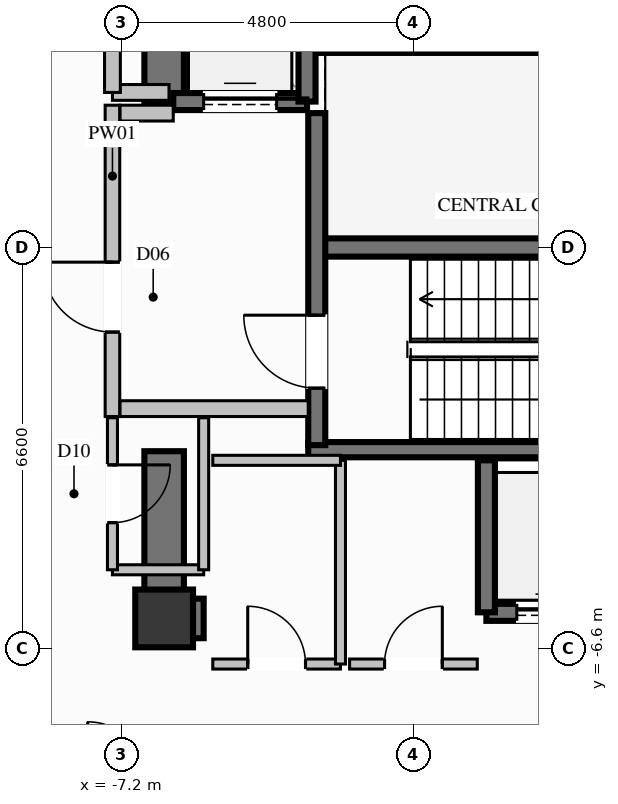
"""IFC4 building model, lengths in metres.
Left out: names, types, materials, properties, quantities, classifications, styles, units other than length and angle.
Written with IfcOpenShell. Run it as: python <this file> out.ifc"""

import sys

from ifc_helpers import new_model, si_unit, direction, frame, frame_2d, origin, origin_2d, place, context, subcontext, project, spatial, rectangle, extrude, element, fill, save


model = new_model("IFC4")
c1 = context("Model", 3, precision=1e-05, world=origin(), true_north=direction((0.0, 1.0)))
c2 = subcontext(c1, "Body", "Model", "MODEL_VIEW")
j1 = project(units=[si_unit("LENGTHUNIT", "METRE"), si_unit("PLANEANGLEUNIT", "RADIAN")], contexts=[c1])
p1 = place(None, origin())
s1 = spatial("IfcSite", under=j1, at=p1, CompositionType="ELEMENT")
p2 = place(p1, origin())
s2 = spatial("IfcBuilding", under=s1, at=p2, CompositionType="ELEMENT")
p3 = place(p2, frame((0.0, 0.0, 109.8)))
s3 = spatial("IfcBuildingStorey", under=s2, at=p3, CompositionType="ELEMENT", Elevation=109.8)
p4 = place(p3, frame((-6.5, -6.1, 0.0), z_axis=(0.0, 0.0, 1.0), x_axis=(1.0, 0.0, 0.0)))
e1 = element("IfcColumn", 1, at=p4, inside=s3, PredefinedType="COLUMN", context=c2, shape_type="SweptSolid", body=[
    extrude(rectangle(XDim=0.95, YDim=0.95, at=origin_2d()), origin(), (0.0, 0.0, 1.0), 3.6),
])
p5 = place(p3, frame((-3.99, 0.0, 0.0), z_axis=(0.0, 0.0, 1.0), x_axis=(1.0, 0.0, 0.0)))
e2 = element("IfcWall", 2, at=p5, inside=s3, PredefinedType="SHEAR", context=c2, shape_type="SweptSolid", body=[
    extrude(rectangle(XDim=7.98, YDim=0.3, at=frame_2d((3.99, 0.0))), origin(), (0.0, 0.0, 1.0), 3.6),
])
for number, where, z_axis, x_axis in (
    (3, (-4.13, -3.325, 0.0), (0.0, 0.0, 1.0), (1.0, 0.0, 0.0)),
    (4, (-4.13, 3.325, 0.0), (0.0, 0.0, 1.0), (1.0, 0.0, 0.0)),
):
    element("IfcWall", number, at=place(p3, frame(where, z_axis=z_axis, x_axis=x_axis)), inside=s3, PredefinedType="SOLIDWALL", context=c2, shape_type="SweptSolid", body=[
        extrude(rectangle(XDim=8.26, YDim=0.25, at=frame_2d((4.13, 0.0))), origin(), (0.0, 0.0, 1.0), 3.6),
    ])
p6 = place(p3, frame((-6.175, -6.1, 0.0), z_axis=(0.0, 0.0, 1.0), x_axis=(1.0, 0.0, 0.0)))
e5 = element("IfcWall", 5, at=p6, inside=s3, PredefinedType="SHEAR", context=c2, shape_type="SweptSolid", body=[
    extrude(rectangle(XDim=0.325, YDim=0.65, at=frame_2d((0.163, 0.0))), origin(), (0.0, 0.0, 1.0), 3.6),
])
p7 = place(p3, frame((-6.5, 2.35, 0.0), z_axis=(0.0, 0.0, 1.0), x_axis=(0.0, 1.0, 0.0)))
e6 = element("IfcWall", 6, at=p7, inside=s3, PredefinedType="SHEAR", context=c2, shape_type="SweptSolid", body=[
    extrude(rectangle(XDim=4.075, YDim=0.65, at=frame_2d((2.038, 0.0))), origin(), (0.0, 0.0, 1.0), 3.6),
])
p8 = place(p3, frame((-6.5, -6.425, 0.0), z_axis=(0.0, 0.0, 1.0), x_axis=(0.0, 1.0, 0.0)))
e7 = element("IfcWall", 7, at=p8, inside=s3, PredefinedType="SHEAR", context=c2, shape_type="SweptSolid", body=[
    extrude(rectangle(XDim=3.075, YDim=0.65, at=frame_2d((1.538, 0.0))), origin(), (0.0, 0.0, 1.0), 3.6),
])
p9 = place(p3, frame((-1.2, -6.0, 0.0), z_axis=(0.0, 0.0, 1.0), x_axis=(1.0, 0.0, 0.0)))
e8 = element("IfcWall", 8, at=p9, inside=s3, PredefinedType="SOLIDWALL", context=c2, shape_type="SweptSolid", body=[
    extrude(rectangle(XDim=2.1, YDim=0.28, at=frame_2d((1.05, 0.0))), origin(), (0.0, 0.0, 1.0), 3.35),
])
p10 = place(p9, frame((0.5, 0.0, 0.0)))
e9 = element("IfcOpeningElement", 9, at=p10, cuts=e8, PredefinedType="OPENING", context=c2, shape_type="SweptSolid", body=[
    extrude(rectangle(XDim=1.1, YDim=2.2, at=frame_2d((0.55, 1.1))), frame((0.0, 0.15, 0.0), z_axis=(0.0, -1.0, 0.0), x_axis=(1.0, 0.0, 0.0)), (0.0, 0.0, 1.0), 0.3),
])
p11 = place(p3, frame((-1.2, -3.5, 0.0), z_axis=(0.0, 0.0, 1.0), x_axis=(0.0, -1.0, 0.0)))
e10 = element("IfcWall", 10, at=p11, inside=s3, PredefinedType="SOLIDWALL", context=c2, shape_type="SweptSolid", body=[
    extrude(rectangle(XDim=2.5, YDim=0.28, at=frame_2d((1.25, 0.0))), origin(), (0.0, 0.0, 1.0), 3.35),
])
p12 = place(p3, frame((-6.35, 2.4, 0.0), z_axis=(0.0, 0.0, 1.0), x_axis=(1.0, 0.0, 0.0)))
e11 = element("IfcWall", 11, at=p12, inside=s3, PredefinedType="SOLIDWALL", context=c2, shape_type="SweptSolid", body=[
    extrude(rectangle(XDim=2.2, YDim=0.28, at=frame_2d((1.1, 0.0))), origin(), (0.0, 0.0, 1.0), 3.35),
])
p13 = place(p12, frame((0.5, 0.0, 0.0)))
e12 = element("IfcOpeningElement", 12, at=p13, cuts=e11, PredefinedType="OPENING", context=c2, shape_type="SweptSolid", body=[
    extrude(rectangle(XDim=1.2, YDim=2.2, at=frame_2d((0.6, 1.1))), frame((0.0, 0.15, 0.0), z_axis=(0.0, -1.0, 0.0), x_axis=(1.0, 0.0, 0.0)), (0.0, 0.0, 1.0), 0.3),
])
p14 = place(p3, frame((-4.15, 2.4, 0.0), z_axis=(0.0, 0.0, 1.0), x_axis=(0.0, 1.0, 0.0)))
e13 = element("IfcWall", 13, at=p14, inside=s3, PredefinedType="SOLIDWALL", context=c2, shape_type="SweptSolid", body=[
    extrude(rectangle(XDim=2.7, YDim=0.28, at=frame_2d((1.35, 0.0))), origin(), (0.0, 0.0, 1.0), 3.35),
])
p15 = place(p3, frame((-3.99, -3.25, 0.0), z_axis=(0.0, 0.0, 1.0), x_axis=(0.0, 1.0, 0.0)))
e14 = element("IfcWall", 14, at=p15, inside=s3, PredefinedType="SOLIDWALL", context=c2, shape_type="SweptSolid", body=[
    extrude(rectangle(XDim=5.46, YDim=0.28, at=frame_2d((2.73, 0.0))), origin(), (0.0, 0.0, 1.0), 3.35),
])
p16 = place(p15, frame((0.937, 0.0, 0.0)))
e15 = element("IfcOpeningElement", 15, at=p16, cuts=e14, PredefinedType="OPENING", context=c2, shape_type="SweptSolid", body=[
    extrude(rectangle(XDim=1.2, YDim=2.2, at=frame_2d((0.6, 1.1))), frame((0.0, 0.15, 0.0), z_axis=(0.0, -1.0, 0.0), x_axis=(1.0, 0.0, 0.0)), (0.0, 0.0, 1.0), 0.3),
])
p17 = place(p3, frame((-7.35, -2.78, 0.0), z_axis=(0.0, 0.0, 1.0), x_axis=(0.0, 1.0, 0.0)))
e16 = element("IfcWall", 16, at=p17, inside=s3, PredefinedType="PARTITIONING", context=c2, shape_type="SweptSolid", body=[
    extrude(rectangle(XDim=5.12, YDim=0.24, at=frame_2d((2.56, 0.0))), origin(), (0.0, 0.0, 1.0), 2.435),
])
p18 = place(p17, frame((1.389, 0.0, 0.0)))
e17 = element("IfcOpeningElement", 17, at=p18, cuts=e16, PredefinedType="OPENING", context=c2, shape_type="SweptSolid", body=[
    extrude(rectangle(XDim=1.15, YDim=2.2, at=frame_2d((0.575, 1.1))), frame((0.0, 0.13, 0.0), z_axis=(0.0, -1.0, 0.0), x_axis=(1.0, 0.0, 0.0)), (0.0, 0.0, 1.0), 0.26),
])
p19 = place(p3, frame((-7.225, -2.65, 0.0), z_axis=(0.0, 0.0, 1.0), x_axis=(1.0, 0.0, 0.0)))
e18 = element("IfcWall", 18, at=p19, inside=s3, PredefinedType="PARTITIONING", context=c2, shape_type="SweptSolid", body=[
    extrude(rectangle(XDim=3.095, YDim=0.26, at=frame_2d((1.548, 0.0))), origin(), (0.0, 0.0, 1.0), 3.35),
])
p20 = place(p3, frame((-7.225, 2.21, 0.0), z_axis=(0.0, 0.0, 1.0), x_axis=(1.0, 0.0, 0.0)))
e19 = element("IfcWall", 19, at=p20, inside=s3, PredefinedType="PARTITIONING", context=c2, shape_type="SweptSolid", body=[
    extrude(rectangle(XDim=0.875, YDim=0.26, at=frame_2d((0.438, 0.0))), origin(), (0.0, 0.0, 1.0), 3.35),
])
p21 = place(p3, frame((-7.35, 2.55, 0.0), z_axis=(0.0, 0.0, 1.0), x_axis=(1.0, 0.0, 0.0)))
e20 = element("IfcWall", 20, at=p21, inside=s3, PredefinedType="PARTITIONING", context=c2, shape_type="SweptSolid", body=[
    extrude(rectangle(XDim=0.93, YDim=0.26, at=frame_2d((0.465, 0.0))), origin(), (0.0, 0.0, 1.0), 3.35),
])
p22 = place(p3, frame((-7.35, 2.55, 0.0), z_axis=(0.0, 0.0, 1.0), x_axis=(0.0, 1.0, 0.0)))
e21 = element("IfcWall", 21, at=p22, inside=s3, PredefinedType="PARTITIONING", context=c2, shape_type="SweptSolid", body=[
    extrude(rectangle(XDim=2.4, YDim=0.26, at=frame_2d((1.2, 0.0))), origin(), (0.0, 0.0, 1.0), 2.435),
])
p23 = place(p22, frame((0.775, 0.0, 0.0)))
e22 = element("IfcOpeningElement", 22, at=p23, cuts=e21, PredefinedType="OPENING", context=c2, shape_type="SweptSolid", body=[
    extrude(rectangle(XDim=0.85, YDim=2.05, at=frame_2d((0.425, 1.025))), frame((0.0, 0.14, 0.0), z_axis=(0.0, -1.0, 0.0), x_axis=(1.0, 0.0, 0.0)), (0.0, 0.0, 1.0), 0.28),
])
p24 = place(p3, frame((-7.35, -5.3, 0.0), z_axis=(0.0, 0.0, 1.0), x_axis=(1.0, 0.0, 0.0)))
e23 = element("IfcWall", 23, at=p24, inside=s3, PredefinedType="PARTITIONING", context=c2, shape_type="SweptSolid", body=[
    extrude(rectangle(XDim=1.5, YDim=0.165, at=frame_2d((0.75, 0.0))), origin(), (0.0, 0.0, 1.0), 2.435),
])
p25 = place(p3, frame((-5.85, -5.3, 0.0), z_axis=(0.0, 0.0, 1.0), x_axis=(0.0, 1.0, 0.0)))
e24 = element("IfcWall", 24, at=p25, inside=s3, PredefinedType="PARTITIONING", context=c2, shape_type="SweptSolid", body=[
    extrude(rectangle(XDim=2.5, YDim=0.165, at=frame_2d((1.25, 0.0))), origin(), (0.0, 0.0, 1.0), 2.435),
])
p26 = place(p3, frame((-7.35, -2.8, 0.0), z_axis=(0.0, 0.0, 1.0), x_axis=(0.0, -1.0, 0.0)))
e25 = element("IfcWall", 25, at=p26, inside=s3, PredefinedType="PARTITIONING", context=c2, shape_type="SweptSolid", body=[
    extrude(rectangle(XDim=2.5, YDim=0.165, at=frame_2d((1.25, 0.0))), origin(), (0.0, 0.0, 1.0), 3.35),
])
p27 = place(p26, frame((0.775, 0.0, 0.0)))
e26 = element("IfcOpeningElement", 26, at=p27, cuts=e25, PredefinedType="OPENING", context=c2, shape_type="SweptSolid", body=[
    extrude(rectangle(XDim=0.95, YDim=2.1, at=frame_2d((0.475, 1.05))), frame((0.0, 0.093, 0.0), z_axis=(0.0, -1.0, 0.0), x_axis=(1.0, 0.0, 0.0)), (0.0, 0.0, 1.0), 0.185),
])
p28 = place(p3, frame((-5.7, -6.85, 0.0), z_axis=(0.0, 0.0, 1.0), x_axis=(1.0, 0.0, 0.0)))
e27 = element("IfcWall", 27, at=p28, inside=s3, PredefinedType="PARTITIONING", context=c2, shape_type="SweptSolid", body=[
    extrude(rectangle(XDim=2.1, YDim=0.165, at=frame_2d((1.05, 0.0))), origin(), (0.0, 0.0, 1.0), 2.435),
])
p29 = place(p28, frame((0.575, 0.0, 0.0)))
e28 = element("IfcOpeningElement", 28, at=p29, cuts=e27, PredefinedType="OPENING", context=c2, shape_type="SweptSolid", body=[
    extrude(rectangle(XDim=0.95, YDim=2.1, at=frame_2d((0.475, 1.05))), frame((0.0, 0.093, 0.0), z_axis=(0.0, -1.0, 0.0), x_axis=(1.0, 0.0, 0.0)), (0.0, 0.0, 1.0), 0.185),
])
p30 = place(p3, frame((-3.6, -6.85, 0.0), z_axis=(0.0, 0.0, 1.0), x_axis=(0.0, 1.0, 0.0)))
e29 = element("IfcWall", 29, at=p30, inside=s3, PredefinedType="PARTITIONING", context=c2, shape_type="SweptSolid", body=[
    extrude(rectangle(XDim=3.35, YDim=0.165, at=frame_2d((1.675, 0.0))), origin(), (0.0, 0.0, 1.0), 3.35),
])
p31 = place(p3, frame((-3.6, -3.5, 0.0), z_axis=(0.0, 0.0, 1.0), x_axis=(-1.0, 0.0, 0.0)))
e30 = element("IfcWall", 30, at=p31, inside=s3, PredefinedType="PARTITIONING", context=c2, shape_type="SweptSolid", body=[
    extrude(rectangle(XDim=2.1, YDim=0.165, at=frame_2d((1.05, 0.0))), origin(), (0.0, 0.0, 1.0), 3.35),
])
p32 = place(p3, frame((-3.45, -6.85, 0.0), z_axis=(0.0, 0.0, 1.0), x_axis=(1.0, 0.0, 0.0)))
e31 = element("IfcWall", 31, at=p32, inside=s3, PredefinedType="PARTITIONING", context=c2, shape_type="SweptSolid", body=[
    extrude(rectangle(XDim=2.1, YDim=0.165, at=frame_2d((1.05, 0.0))), origin(), (0.0, 0.0, 1.0), 2.435),
])
p33 = place(p32, frame((0.575, 0.0, 0.0)))
e32 = element("IfcOpeningElement", 32, at=p33, cuts=e31, PredefinedType="OPENING", context=c2, shape_type="SweptSolid", body=[
    extrude(rectangle(XDim=0.95, YDim=2.1, at=frame_2d((0.475, 1.05))), frame((0.0, 0.093, 0.0), z_axis=(0.0, -1.0, 0.0), x_axis=(1.0, 0.0, 0.0)), (0.0, 0.0, 1.0), 0.185),
])
p34 = place(p10, origin())
e33 = element("IfcDoor", 33, at=p34, inside=s3, OperationType="SLIDING_TO_LEFT", PredefinedType="DOOR", context=c2, shape_type="SweptSolid", body=[
    extrude(rectangle(XDim=1.1, YDim=2.2, at=frame_2d((0.55, 1.1))), frame((0.0, 0.025, 0.0), z_axis=(0.0, -1.0, 0.0), x_axis=(1.0, 0.0, 0.0)), (0.0, 0.0, 1.0), 0.05),
])
fill(e9, e33)
p35 = place(p13, origin())
e34 = element("IfcDoor", 34, at=p35, inside=s3, OperationType="SLIDING_TO_LEFT", PredefinedType="DOOR", context=c2, shape_type="SweptSolid", body=[
    extrude(rectangle(XDim=1.2, YDim=2.2, at=frame_2d((0.6, 1.1))), frame((0.0, 0.025, 0.0), z_axis=(0.0, -1.0, 0.0), x_axis=(1.0, 0.0, 0.0)), (0.0, 0.0, 1.0), 0.05),
])
fill(e12, e34)
p36 = place(p16, origin())
e35 = element("IfcDoor", 35, at=p36, inside=s3, OperationType="SINGLE_SWING_RIGHT", PredefinedType="DOOR", context=c2, shape_type="SweptSolid", body=[
    extrude(rectangle(XDim=1.2, YDim=2.2, at=frame_2d((0.6, 1.1))), frame((0.0, 0.025, 0.0), z_axis=(0.0, -1.0, 0.0), x_axis=(1.0, 0.0, 0.0)), (0.0, 0.0, 1.0), 0.05),
])
fill(e15, e35)
p37 = place(p18, origin())
e36 = element("IfcDoor", 36, at=p37, inside=s3, OperationType="SINGLE_SWING_RIGHT", PredefinedType="DOOR", context=c2, shape_type="SweptSolid", body=[
    extrude(rectangle(XDim=1.15, YDim=2.2, at=frame_2d((0.575, 1.1))), frame((0.0, 0.025, 0.0), z_axis=(0.0, -1.0, 0.0), x_axis=(1.0, 0.0, 0.0)), (0.0, 0.0, 1.0), 0.05),
])
fill(e17, e36)
p38 = place(p27, origin())
e37 = element("IfcDoor", 37, at=p38, inside=s3, OperationType="SINGLE_SWING_LEFT", PredefinedType="DOOR", context=c2, shape_type="SweptSolid", body=[
    extrude(rectangle(XDim=0.95, YDim=2.1, at=frame_2d((0.475, 1.05))), frame((0.0, 0.025, 0.0), z_axis=(0.0, -1.0, 0.0), x_axis=(1.0, 0.0, 0.0)), (0.0, 0.0, 1.0), 0.05),
])
fill(e26, e37)
p39 = place(p29, origin())
e38 = element("IfcDoor", 38, at=p39, inside=s3, OperationType="SINGLE_SWING_LEFT", PredefinedType="DOOR", context=c2, shape_type="SweptSolid", body=[
    extrude(rectangle(XDim=0.95, YDim=2.1, at=frame_2d((0.475, 1.05))), frame((0.0, 0.025, 0.0), z_axis=(0.0, -1.0, 0.0), x_axis=(1.0, 0.0, 0.0)), (0.0, 0.0, 1.0), 0.05),
])
fill(e28, e38)
p40 = place(p33, origin())
e39 = element("IfcDoor", 39, at=p40, inside=s3, OperationType="SINGLE_SWING_RIGHT", PredefinedType="DOOR", context=c2, shape_type="SweptSolid", body=[
    extrude(rectangle(XDim=0.95, YDim=2.1, at=frame_2d((0.475, 1.05))), frame((0.0, 0.025, 0.0), z_axis=(0.0, -1.0, 0.0), x_axis=(1.0, 0.0, 0.0)), (0.0, 0.0, 1.0), 0.05),
])
fill(e32, e39)
save(model, sys.argv[1])
